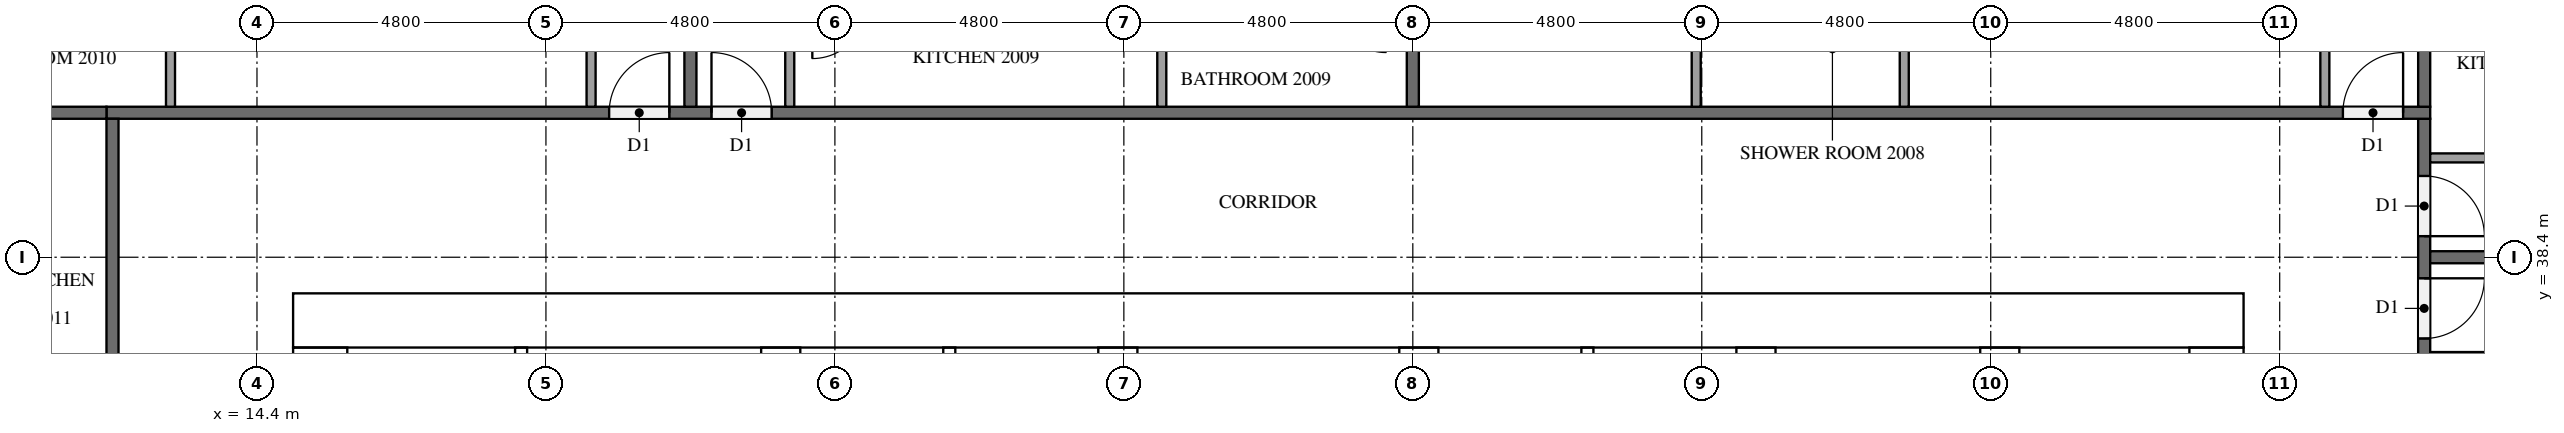
"""IFC4 building model, lengths in metres.
Left out: names, types, materials, properties, quantities, classifications, styles, units other than length and angle.
Written with IfcOpenShell. Run it as: python <this file> out.ifc"""

import sys

from ifc_helpers import new_model, si_unit, direction, frame, frame_2d, origin, place, context, subcontext, project, spatial, rectangle, extrude, element, fill, save


model = new_model("IFC4")
c1 = context("Model", 3, precision=1e-05, world=origin(), true_north=direction((0.0, 1.0)))
c2 = subcontext(c1, "Body", "Model", "MODEL_VIEW")
j1 = project(units=[si_unit("LENGTHUNIT", "METRE"), si_unit("PLANEANGLEUNIT", "RADIAN")], contexts=[c1])
p1 = place(None, origin())
s1 = spatial("IfcSite", under=j1, at=p1, CompositionType="ELEMENT")
p2 = place(p1, origin())
s2 = spatial("IfcBuilding", under=s1, at=p2, CompositionType="ELEMENT")
p3 = place(p2, frame((0.0, 0.0, 80.3)))
s3 = spatial("IfcBuildingStorey", under=s2, at=p3, CompositionType="ELEMENT", Elevation=80.3)
p4 = place(p3, frame((15.0, 37.35, 0.0), z_axis=(0.0, 0.0, 1.0), x_axis=(1.0, 0.0, 0.0)))
e1 = element("IfcWall", 1, at=p4, inside=s3, PredefinedType="SHEAR", context=c2, shape_type="SweptSolid", body=[
    extrude(rectangle(XDim=32.4, YDim=0.9, at=frame_2d((16.2, 0.0))), origin(), (0.0, 0.0, 1.0), 3.1),
])
p5 = place(p4, frame((15.3, 0.0, 0.0)))
e2 = element("IfcOpeningElement", 2, at=p5, cuts=e1, PredefinedType="OPENING", context=c2, shape_type="SweptSolid", body=[
    extrude(rectangle(XDim=1.8, YDim=2.1, at=frame_2d((0.9, 1.05))), frame((0.0, 0.46, 0.0), z_axis=(0.0, -1.0, 0.0), x_axis=(1.0, 0.0, 0.0)), (0.0, 0.0, 1.0), 0.92),
])
p6 = place(p4, frame((1.794, 0.0, 0.0)))
e3 = element("IfcOpeningElement", 3, at=p6, cuts=e1, PredefinedType="OPENING", context=c2, shape_type="SweptSolid", body=[
    extrude(rectangle(XDim=1.0, YDim=2.1, at=frame_2d((0.5, 1.05))), frame((0.0, 0.46, 0.0), z_axis=(0.0, -1.0, 0.0), x_axis=(1.0, 0.0, 0.0)), (0.0, 0.0, 1.0), 0.92),
])
p7 = place(p4, frame((5.331, 0.0, 0.0)))
e4 = element("IfcOpeningElement", 4, at=p7, cuts=e1, PredefinedType="OPENING", context=c2, shape_type="SweptSolid", body=[
    extrude(rectangle(XDim=1.0, YDim=2.1, at=frame_2d((0.5, 1.05))), frame((0.0, 0.46, 0.0), z_axis=(0.0, -1.0, 0.0), x_axis=(1.0, 0.0, 0.0)), (0.0, 0.0, 1.0), 0.92),
])
p8 = place(p3, frame((15.45, 15.9, 0.0), z_axis=(0.0, 0.0, 1.0), x_axis=(0.0, 1.0, 0.0)))
e5 = element("IfcWall", 5, at=p8, inside=s3, PredefinedType="SHEAR", context=c2, shape_type="SweptSolid", body=[
    extrude(rectangle(XDim=21.0, YDim=0.9, at=frame_2d((10.5, 0.0))), origin(), (0.0, 0.0, 1.0), 3.1),
])
p9 = place(p8, frame((4.86, 0.0, 0.0)))
e6 = element("IfcOpeningElement", 6, at=p9, cuts=e5, PredefinedType="OPENING", context=c2, shape_type="SweptSolid", body=[
    extrude(rectangle(XDim=1.2, YDim=2.1, at=frame_2d((0.6, 1.05))), frame((0.0, 0.46, 0.0), z_axis=(0.0, -1.0, 0.0), x_axis=(1.0, 0.0, 0.0)), (0.0, 0.0, 1.0), 0.92),
])
p10 = place(p3, frame((46.95, 15.9, 0.0), z_axis=(0.0, 0.0, 1.0), x_axis=(0.0, 1.0, 0.0)))
e7 = element("IfcWall", 7, at=p10, inside=s3, PredefinedType="SHEAR", context=c2, shape_type="SweptSolid", body=[
    extrude(rectangle(XDim=21.0, YDim=0.9, at=frame_2d((10.5, 0.0))), origin(), (0.0, 0.0, 1.0), 3.1),
])
p11 = place(p10, frame((10.2, 0.0, 0.0)))
e8 = element("IfcOpeningElement", 8, at=p11, cuts=e7, PredefinedType="OPENING", context=c2, shape_type="SweptSolid", body=[
    extrude(rectangle(XDim=1.2, YDim=2.1, at=frame_2d((0.6, 1.05))), frame((0.0, 0.46, 0.0), z_axis=(0.0, -1.0, 0.0), x_axis=(1.0, 0.0, 0.0)), (0.0, 0.0, 1.0), 0.92),
])
p12 = place(p3, frame((23.1, 15.9, 0.0), z_axis=(0.0, 0.0, 1.0), x_axis=(0.0, 1.0, 0.0)))
e9 = element("IfcWall", 9, at=p12, inside=s3, PredefinedType="SHEAR", context=c2, shape_type="SweptSolid", body=[
    extrude(rectangle(XDim=21.0, YDim=0.65, at=frame_2d((10.5, 0.0))), origin(), (0.0, 0.0, 1.0), 3.1),
])
p13 = place(p3, frame((39.3, 27.75, 0.0), z_axis=(0.0, 0.0, 1.0), x_axis=(0.0, 1.0, 0.0)))
e10 = element("IfcWall", 10, at=p13, inside=s3, PredefinedType="SHEAR", context=c2, shape_type="SweptSolid", body=[
    extrude(rectangle(XDim=9.15, YDim=0.65, at=frame_2d((4.575, 0.0))), origin(), (0.0, 0.0, 1.0), 3.1),
])
p14 = place(p3, frame((43.35, 27.75, 0.0), z_axis=(0.0, 0.0, 1.0), x_axis=(0.0, 1.0, 0.0)))
e11 = element("IfcWall", 11, at=p14, inside=s3, PredefinedType="SHEAR", context=c2, shape_type="SweptSolid", body=[
    extrude(rectangle(XDim=9.15, YDim=0.65, at=frame_2d((4.575, 0.0))), origin(), (0.0, 0.0, 1.0), 3.1),
])
p15 = place(p14, frame((7.65, 0.0, 0.0)))
e12 = element("IfcOpeningElement", 12, at=p15, cuts=e11, PredefinedType="OPENING", context=c2, shape_type="SweptSolid", body=[
    extrude(rectangle(XDim=1.2, YDim=2.1, at=frame_2d((0.6, 1.05))), frame((0.0, 0.335, 0.0), z_axis=(0.0, -1.0, 0.0), x_axis=(1.0, 0.0, 0.0)), (0.0, 0.0, 1.0), 0.67),
])
for number, where, z_axis, x_axis in (
    (13, (28.7, 33.875, 0.0), (0.0, 0.0, 1.0), (0.0, 1.0, 0.0)),
    (14, (33.7, 33.875, 0.0), (0.0, 0.0, 1.0), (0.0, 1.0, 0.0)),
):
    element("IfcWall", number, at=place(p3, frame(where, z_axis=z_axis, x_axis=x_axis)), inside=s3, PredefinedType="SHEAR", context=c2, shape_type="SweptSolid", body=[
        extrude(rectangle(XDim=3.025, YDim=0.65, at=frame_2d((1.512, 0.0))), origin(), (0.0, 0.0, 1.0), 3.1),
    ])
for number, where, z_axis, x_axis in (
    (15, (25.9, 33.875, 0.0), (0.0, 0.0, 1.0), (0.0, 1.0, 0.0)),
    (16, (36.5, 33.875, 0.0), (0.0, 0.0, 1.0), (0.0, 1.0, 0.0)),
):
    element("IfcWall", number, at=place(p3, frame(where, z_axis=z_axis, x_axis=x_axis)), inside=s3, PredefinedType="SOLIDWALL", context=c2, shape_type="SweptSolid", body=[
        extrude(rectangle(XDim=3.025, YDim=0.2, at=frame_2d((1.512, 0.0))), origin(), (0.0, 0.0, 1.0), 3.1),
    ])
p16 = place(p3, frame((18.788, 31.575, 0.0), z_axis=(0.0, 0.0, 1.0), x_axis=(0.0, 1.0, 0.0)))
e17 = element("IfcWall", 17, at=p16, inside=s3, PredefinedType="PARTITIONING", context=c2, shape_type="SweptSolid", body=[
    extrude(rectangle(XDim=5.325, YDim=0.2, at=frame_2d((2.663, 0.0))), origin(), (0.0, 0.0, 1.0), 3.1),
])
p17 = place(p3, frame((50.4, 40.7, 0.0), z_axis=(0.0, 0.0, 1.0), x_axis=(0.0, -1.0, 0.0)))
e18 = element("IfcWall", 18, at=p17, inside=s3, PredefinedType="PARTITIONING", context=c2, shape_type="SweptSolid", body=[
    extrude(rectangle(XDim=28.6, YDim=0.2, at=frame_2d((14.3, 0.0))), origin(), (0.0, 0.0, 1.0), 3.1),
])
p18 = place(p17, frame((26.65, 0.0, 0.0)))
e19 = element("IfcOpeningElement", 19, at=p18, cuts=e18, PredefinedType="OPENING", context=c2, shape_type="SweptSolid", body=[
    extrude(rectangle(XDim=1.0, YDim=2.1, at=frame_2d((0.5, 1.05))), frame((0.0, 0.11, 0.0), z_axis=(0.0, -1.0, 0.0), x_axis=(1.0, 0.0, 0.0)), (0.0, 0.0, 1.0), 0.22),
])
p19 = place(p17, frame((9.85, 0.0, 0.0)))
e20 = element("IfcOpeningElement", 20, at=p19, cuts=e18, PredefinedType="OPENING", context=c2, shape_type="SweptSolid", body=[
    extrude(rectangle(XDim=1.0, YDim=2.1, at=frame_2d((0.5, 1.05))), frame((0.0, 0.11, 0.0), z_axis=(0.0, -1.0, 0.0), x_axis=(1.0, 0.0, 0.0)), (0.0, 0.0, 1.0), 0.22),
])
p20 = place(p17, frame((2.65, 0.0, 0.0)))
e21 = element("IfcOpeningElement", 21, at=p20, cuts=e18, PredefinedType="OPENING", context=c2, shape_type="SweptSolid", body=[
    extrude(rectangle(XDim=1.0, YDim=2.1, at=frame_2d((0.5, 1.05))), frame((0.0, 0.11, 0.0), z_axis=(0.0, -1.0, 0.0), x_axis=(1.0, 0.0, 0.0)), (0.0, 0.0, 1.0), 0.22),
])
p21 = place(p17, frame((0.95, 0.0, 0.0)))
e22 = element("IfcOpeningElement", 22, at=p21, cuts=e18, PredefinedType="OPENING", context=c2, shape_type="SweptSolid", body=[
    extrude(rectangle(XDim=1.0, YDim=2.1, at=frame_2d((0.5, 1.05))), frame((0.0, 0.11, 0.0), z_axis=(0.0, -1.0, 0.0), x_axis=(1.0, 0.0, 0.0)), (0.0, 0.0, 1.0), 0.22),
])
p22 = place(p3, frame((11.9, 40.8, 0.0), z_axis=(0.0, 0.0, 1.0), x_axis=(1.0, 0.0, 0.0)))
e23 = element("IfcWall", 23, at=p22, inside=s3, PredefinedType="PARTITIONING", context=c2, shape_type="SweptSolid", body=[
    extrude(rectangle(XDim=38.6, YDim=0.2, at=frame_2d((19.3, 0.0))), origin(), (0.0, 0.0, 1.0), 3.1),
])
p23 = place(p22, frame((37.15, 0.0, 0.0)))
e24 = element("IfcOpeningElement", 24, at=p23, cuts=e23, PredefinedType="OPENING", context=c2, shape_type="SweptSolid", body=[
    extrude(rectangle(XDim=1.0, YDim=2.1, at=frame_2d((0.5, 1.05))), frame((0.0, 0.11, 0.0), z_axis=(0.0, -1.0, 0.0), x_axis=(1.0, 0.0, 0.0)), (0.0, 0.0, 1.0), 0.22),
])
p24 = place(p22, frame((10.05, 0.0, 0.0)))
e25 = element("IfcOpeningElement", 25, at=p24, cuts=e23, PredefinedType="OPENING", context=c2, shape_type="SweptSolid", body=[
    extrude(rectangle(XDim=1.0, YDim=2.1, at=frame_2d((0.5, 1.05))), frame((0.0, 0.11, 0.0), z_axis=(0.0, -1.0, 0.0), x_axis=(1.0, 0.0, 0.0)), (0.0, 0.0, 1.0), 0.22),
])
p25 = place(p22, frame((8.35, 0.0, 0.0)))
e26 = element("IfcOpeningElement", 26, at=p25, cuts=e23, PredefinedType="OPENING", context=c2, shape_type="SweptSolid", body=[
    extrude(rectangle(XDim=1.0, YDim=2.1, at=frame_2d((0.5, 1.05))), frame((0.0, 0.11, 0.0), z_axis=(0.0, -1.0, 0.0), x_axis=(1.0, 0.0, 0.0)), (0.0, 0.0, 1.0), 0.22),
])
p26 = place(p3, frame((12.0, 12.1, 0.0), z_axis=(0.0, 0.0, 1.0), x_axis=(0.0, 1.0, 0.0)))
e27 = element("IfcWall", 27, at=p26, inside=s3, PredefinedType="PARTITIONING", context=c2, shape_type="SweptSolid", body=[
    extrude(rectangle(XDim=28.6, YDim=0.2, at=frame_2d((14.3, 0.0))), origin(), (0.0, 0.0, 1.0), 3.1),
])
p27 = place(p26, frame((17.05, 0.0, 0.0)))
e28 = element("IfcOpeningElement", 28, at=p27, cuts=e27, PredefinedType="OPENING", context=c2, shape_type="SweptSolid", body=[
    extrude(rectangle(XDim=1.0, YDim=2.1, at=frame_2d((0.5, 1.05))), frame((0.0, 0.11, 0.0), z_axis=(0.0, -1.0, 0.0), x_axis=(1.0, 0.0, 0.0)), (0.0, 0.0, 1.0), 0.22),
])
p28 = place(p26, frame((15.35, 0.0, 0.0)))
e29 = element("IfcOpeningElement", 29, at=p28, cuts=e27, PredefinedType="OPENING", context=c2, shape_type="SweptSolid", body=[
    extrude(rectangle(XDim=1.0, YDim=2.1, at=frame_2d((0.5, 1.05))), frame((0.0, 0.11, 0.0), z_axis=(0.0, -1.0, 0.0), x_axis=(1.0, 0.0, 0.0)), (0.0, 0.0, 1.0), 0.22),
])
p29 = place(p26, frame((8.15, 0.0, 0.0)))
e30 = element("IfcOpeningElement", 30, at=p29, cuts=e27, PredefinedType="OPENING", context=c2, shape_type="SweptSolid", body=[
    extrude(rectangle(XDim=1.0, YDim=2.1, at=frame_2d((0.5, 1.05))), frame((0.0, 0.11, 0.0), z_axis=(0.0, -1.0, 0.0), x_axis=(1.0, 0.0, 0.0)), (0.0, 0.0, 1.0), 0.22),
])
p30 = place(p3, frame((50.5, 38.4, 0.0), z_axis=(0.0, 0.0, 1.0), x_axis=(1.0, 0.0, 0.0)))
e31 = element("IfcWall", 31, at=p30, inside=s3, PredefinedType="PARTITIONING", context=c2, shape_type="SweptSolid", body=[
    extrude(rectangle(XDim=11.8, YDim=0.2, at=frame_2d((5.9, 0.0))), origin(), (0.0, 0.0, 1.0), 3.1),
])
for number, where, z_axis, x_axis in (
    (32, (50.4, 40.9, 0.0), (0.0, 0.0, 1.0), (0.0, 1.0, 0.0)),
    (33, (33.6, 47.9, 0.0), (0.0, 0.0, 1.0), (0.0, -1.0, 0.0)),
    (34, (21.6, 47.9, 0.0), (0.0, 0.0, 1.0), (0.0, -1.0, 0.0)),
    (35, (4.9, 40.8, 0.0), (0.0, 0.0, 1.0), (1.0, 0.0, 0.0)),
):
    element("IfcWall", number, at=place(p3, frame(where, z_axis=z_axis, x_axis=x_axis)), inside=s3, PredefinedType="PARTITIONING", context=c2, shape_type="SweptSolid", body=[
        extrude(rectangle(XDim=7.0, YDim=0.2, at=frame_2d((3.5, 0.0))), origin(), (0.0, 0.0, 1.0), 3.1),
    ])
p31 = place(p3, frame((50.5, 36.75, 0.0), z_axis=(0.0, 0.0, 1.0), x_axis=(1.0, 0.0, 0.0)))
e36 = element("IfcWall", 36, at=p31, inside=s3, PredefinedType="PARTITIONING", context=c2, shape_type="SweptSolid", body=[
    extrude(rectangle(XDim=4.625, YDim=0.15, at=frame_2d((2.312, 0.0))), origin(), (0.0, 0.0, 1.0), 3.1),
])
p32 = place(p3, frame((50.5, 40.05, 0.0), z_axis=(0.0, 0.0, 1.0), x_axis=(1.0, 0.0, 0.0)))
e37 = element("IfcWall", 37, at=p32, inside=s3, PredefinedType="PARTITIONING", context=c2, shape_type="SweptSolid", body=[
    extrude(rectangle(XDim=3.125, YDim=0.15, at=frame_2d((1.562, 0.0))), origin(), (0.0, 0.0, 1.0), 3.1),
])
for number, where, z_axis, x_axis in (
    (38, (41.763, 40.9, 0.0), (0.0, 0.0, 1.0), (0.0, 1.0, 0.0)),
    (39, (38.308, 40.9, 0.0), (0.0, 0.0, 1.0), (0.0, 1.0, 0.0)),
):
    element("IfcWall", number, at=place(p3, frame(where, z_axis=z_axis, x_axis=x_axis)), inside=s3, PredefinedType="PARTITIONING", context=c2, shape_type="SweptSolid", body=[
        extrude(rectangle(XDim=2.075, YDim=0.15, at=frame_2d((1.038, 0.0))), origin(), (0.0, 0.0, 1.0), 3.1),
    ])
p33 = place(p3, frame((48.75, 40.9, 0.0), z_axis=(0.0, 0.0, 1.0), x_axis=(0.0, 1.0, 0.0)))
e40 = element("IfcWall", 40, at=p33, inside=s3, PredefinedType="PARTITIONING", context=c2, shape_type="SweptSolid", body=[
    extrude(rectangle(XDim=2.225, YDim=0.15, at=frame_2d((1.113, 0.0))), origin(), (0.0, 0.0, 1.0), 3.1),
])
p34 = place(p3, frame((29.43, 40.9, 0.0), z_axis=(0.0, 0.0, 1.0), x_axis=(0.0, 1.0, 0.0)))
e41 = element("IfcWall", 41, at=p34, inside=s3, PredefinedType="PARTITIONING", context=c2, shape_type="SweptSolid", body=[
    extrude(rectangle(XDim=1.625, YDim=0.15, at=frame_2d((0.812, 0.0))), origin(), (0.0, 0.0, 1.0), 3.1),
])
p35 = place(p3, frame((23.25, 40.9, 0.0), z_axis=(0.0, 0.0, 1.0), x_axis=(0.0, 1.0, 0.0)))
e42 = element("IfcWall", 42, at=p35, inside=s3, PredefinedType="PARTITIONING", context=c2, shape_type="SweptSolid", body=[
    extrude(rectangle(XDim=1.775, YDim=0.15, at=frame_2d((0.888, 0.0))), origin(), (0.0, 0.0, 1.0), 3.1),
])
p36 = place(p3, frame((12.963, 40.9, 0.0), z_axis=(0.0, 0.0, 1.0), x_axis=(0.0, 1.0, 0.0)))
e43 = element("IfcWall", 43, at=p36, inside=s3, PredefinedType="PARTITIONING", context=c2, shape_type="SweptSolid", body=[
    extrude(rectangle(XDim=2.225, YDim=0.15, at=frame_2d((1.113, 0.0))), origin(), (0.0, 0.0, 1.0), 3.1),
])
p37 = place(p3, frame((19.95, 40.9, 0.0), z_axis=(0.0, 0.0, 1.0), x_axis=(0.0, 1.0, 0.0)))
e44 = element("IfcWall", 44, at=p37, inside=s3, PredefinedType="PARTITIONING", context=c2, shape_type="SweptSolid", body=[
    extrude(rectangle(XDim=2.375, YDim=0.15, at=frame_2d((1.188, 0.0))), origin(), (0.0, 0.0, 1.0), 3.1),
])
p38 = place(p5, origin())
e45 = element("IfcDoor", 45, at=p38, inside=s3, OperationType="DOUBLE_DOOR_SINGLE_SWING", PredefinedType="DOOR", context=c2, shape_type="SweptSolid", body=[
    extrude(rectangle(XDim=1.8, YDim=2.1, at=frame_2d((0.9, 1.05))), frame((0.0, 0.025, 0.0), z_axis=(0.0, -1.0, 0.0), x_axis=(1.0, 0.0, 0.0)), (0.0, 0.0, 1.0), 0.05),
])
fill(e2, e45)
p39 = place(p6, origin())
e46 = element("IfcDoor", 46, at=p39, inside=s3, OperationType="SINGLE_SWING_LEFT", PredefinedType="DOOR", context=c2, shape_type="SweptSolid", body=[
    extrude(rectangle(XDim=1.0, YDim=2.1, at=frame_2d((0.5, 1.05))), frame((0.0, 0.025, 0.0), z_axis=(0.0, -1.0, 0.0), x_axis=(1.0, 0.0, 0.0)), (0.0, 0.0, 1.0), 0.05),
])
fill(e3, e46)
p40 = place(p7, origin())
e47 = element("IfcDoor", 47, at=p40, inside=s3, OperationType="SINGLE_SWING_RIGHT", PredefinedType="DOOR", context=c2, shape_type="SweptSolid", body=[
    extrude(rectangle(XDim=1.0, YDim=2.1, at=frame_2d((0.5, 1.05))), frame((0.0, 0.025, 0.0), z_axis=(0.0, -1.0, 0.0), x_axis=(1.0, 0.0, 0.0)), (0.0, 0.0, 1.0), 0.05),
])
fill(e4, e47)
p41 = place(p20, origin())
e48 = element("IfcDoor", 48, at=p41, inside=s3, OperationType="SINGLE_SWING_LEFT", PredefinedType="DOOR", context=c2, shape_type="SweptSolid", body=[
    extrude(rectangle(XDim=1.0, YDim=2.1, at=frame_2d((0.5, 1.05))), frame((0.0, 0.025, 0.0), z_axis=(0.0, -1.0, 0.0), x_axis=(1.0, 0.0, 0.0)), (0.0, 0.0, 1.0), 0.05),
])
fill(e21, e48)
p42 = place(p21, origin())
e49 = element("IfcDoor", 49, at=p42, inside=s3, OperationType="SINGLE_SWING_RIGHT", PredefinedType="DOOR", context=c2, shape_type="SweptSolid", body=[
    extrude(rectangle(XDim=1.0, YDim=2.1, at=frame_2d((0.5, 1.05))), frame((0.0, 0.025, 0.0), z_axis=(0.0, -1.0, 0.0), x_axis=(1.0, 0.0, 0.0)), (0.0, 0.0, 1.0), 0.05),
])
fill(e22, e49)
p43 = place(p23, origin())
e50 = element("IfcDoor", 50, at=p43, inside=s3, OperationType="SINGLE_SWING_RIGHT", PredefinedType="DOOR", context=c2, shape_type="SweptSolid", body=[
    extrude(rectangle(XDim=1.0, YDim=2.1, at=frame_2d((0.5, 1.05))), frame((0.0, 0.025, 0.0), z_axis=(0.0, -1.0, 0.0), x_axis=(1.0, 0.0, 0.0)), (0.0, 0.0, 1.0), 0.05),
])
fill(e24, e50)
p44 = place(p24, origin())
e51 = element("IfcDoor", 51, at=p44, inside=s3, OperationType="SINGLE_SWING_LEFT", PredefinedType="DOOR", context=c2, shape_type="SweptSolid", body=[
    extrude(rectangle(XDim=1.0, YDim=2.1, at=frame_2d((0.5, 1.05))), frame((0.0, 0.025, 0.0), z_axis=(0.0, -1.0, 0.0), x_axis=(1.0, 0.0, 0.0)), (0.0, 0.0, 1.0), 0.05),
])
fill(e25, e51)
p45 = place(p25, origin())
e52 = element("IfcDoor", 52, at=p45, inside=s3, OperationType="SINGLE_SWING_RIGHT", PredefinedType="DOOR", context=c2, shape_type="SweptSolid", body=[
    extrude(rectangle(XDim=1.0, YDim=2.1, at=frame_2d((0.5, 1.05))), frame((0.0, 0.025, 0.0), z_axis=(0.0, -1.0, 0.0), x_axis=(1.0, 0.0, 0.0)), (0.0, 0.0, 1.0), 0.05),
])
fill(e26, e52)
save(model, sys.argv[1])
